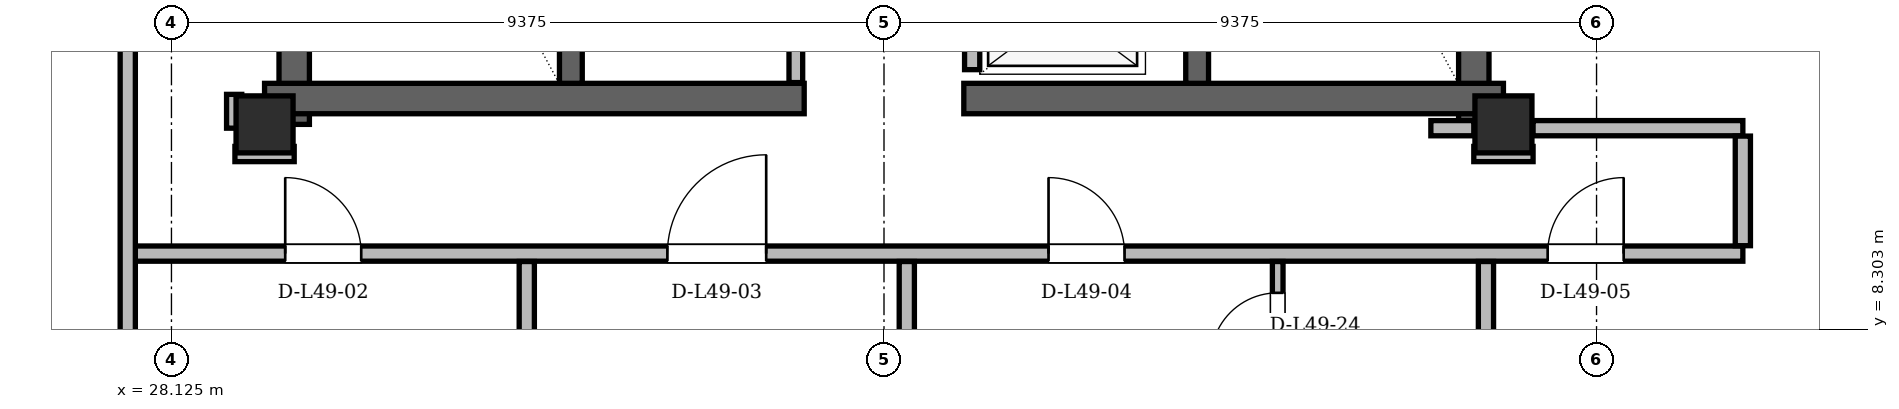
"""IFC4 building model, lengths in metres.
Left out: names, types, materials, properties, quantities, classifications, styles, units other than length and angle.
Written with IfcOpenShell. Run it as: python <this file> out.ifc"""

import sys

from ifc_helpers import new_model, si_unit, direction, frame, frame_2d, origin, origin_2d, place, context, subcontext, project, spatial, rectangle, hollow_rectangle, extrude, element, fill, save


model = new_model("IFC4")
c1 = context("Model", 3, precision=1e-05, world=origin(), true_north=direction((0.0, 1.0)))
c2 = subcontext(c1, "Body", "Model", "MODEL_VIEW")
j1 = project(units=[si_unit("LENGTHUNIT", "METRE"), si_unit("PLANEANGLEUNIT", "RADIAN")], contexts=[c1])
p1 = place(None, origin())
s1 = spatial("IfcSite", under=j1, at=p1, CompositionType="ELEMENT")
p2 = place(p1, origin())
s2 = spatial("IfcBuilding", under=s1, at=p2, CompositionType="ELEMENT")
p3 = place(p2, frame((0.0, 0.0, 185.4)))
s3 = spatial("IfcBuildingStorey", under=s2, at=p3, CompositionType="ELEMENT", Elevation=185.4)
for number, where, z_axis, x_axis in (
    (1, (29.35, 11.0, 0.0), (0.0, 0.0, 1.0), (1.0, 0.0, 0.0)),
    (2, (45.65, 11.0, 0.0), (0.0, 0.0, 1.0), (1.0, 0.0, 0.0)),
):
    element("IfcColumn", number, at=place(p3, frame(where, z_axis=z_axis, x_axis=x_axis)), inside=s3, PredefinedType="COLUMN", context=c2, shape_type="SweptSolid", body=[
        extrude(hollow_rectangle(XDim=0.75, YDim=0.75, WallThickness=0.06, at=origin_2d()), origin(), (0.0, 0.0, 1.0), 3.6),
    ])
for number, where, z_axis, x_axis in (
    (3, (29.74, 11.0, 0.0), (0.0, 0.0, 1.0), (0.0, 1.0, 0.0)),
    (4, (45.26, 11.0, 0.0), (0.0, 0.0, 1.0), (0.0, 1.0, 0.0)),
):
    element("IfcWall", number, at=place(p3, frame(where, z_axis=z_axis, x_axis=x_axis)), inside=s3, PredefinedType="SHEAR", context=c2, shape_type="SweptSolid", body=[
        extrude(rectangle(XDim=13.3, YDim=0.4, at=frame_2d((6.65, 0.0))), origin(), (0.0, 0.0, 1.0), 3.34),
    ])
for number, where, z_axis, x_axis in (
    (5, (29.35, 11.34, 0.0), (0.0, 0.0, 1.0), (1.0, 0.0, 0.0)),
    (6, (38.55, 11.34, 0.0), (0.0, 0.0, 1.0), (1.0, 0.0, 0.0)),
):
    element("IfcWall", number, at=place(p3, frame(where, z_axis=z_axis, x_axis=x_axis)), inside=s3, PredefinedType="SHEAR", context=c2, shape_type="SweptSolid", body=[
        extrude(rectangle(XDim=7.1, YDim=0.4, at=frame_2d((3.55, 0.0))), origin(), (0.0, 0.0, 1.0), 3.34),
    ])
for number, where, z_axis, x_axis in (
    (7, (33.38, 11.54, 0.0), (0.0, 0.0, 1.0), (0.0, 1.0, 0.0)),
    (8, (41.62, 11.54, 0.0), (0.0, 0.0, 1.0), (0.0, 1.0, 0.0)),
):
    element("IfcWall", number, at=place(p3, frame(where, z_axis=z_axis, x_axis=x_axis)), inside=s3, PredefinedType="SHEAR", context=c2, shape_type="SweptSolid", body=[
        extrude(rectangle(XDim=7.62, YDim=0.3, at=frame_2d((3.81, 0.0))), origin(), (0.0, 0.0, 1.0), 3.34),
    ])
p4 = place(p3, frame((59.519, 11.962, 0.0), z_axis=(0.0, 0.0, 1.0), x_axis=(-0.500007042689, 0.866021337648, 0.0)))
e9 = element("IfcWall", 9, at=p4, inside=s3, PredefinedType="SOLIDWALL", context=c2, shape_type="SweptSolid", body=[
    extrude(rectangle(XDim=36.115, YDim=0.29, at=frame_2d((18.057, 0.0))), origin(), (0.0, 0.0, 1.0), 2.56),
])
p5 = place(p4, frame((8.034, 0.0, 0.0)))
e10 = element("IfcOpeningElement", 10, at=p5, cuts=e9, PredefinedType="OPENING", context=c2, shape_type="SweptSolid", body=[
    extrude(rectangle(XDim=1.5, YDim=2.2, at=frame_2d((0.75, 1.1))), frame((0.0, 0.145, 0.0), z_axis=(0.0, -1.0, 0.0), x_axis=(1.0, 0.0, 0.0)), (0.0, 0.0, 1.0), 0.29),
])
p6 = place(p4, frame((28.035, 0.0, 0.0)))
e11 = element("IfcOpeningElement", 11, at=p6, cuts=e9, PredefinedType="OPENING", context=c2, shape_type="SweptSolid", body=[
    extrude(rectangle(XDim=1.5, YDim=2.2, at=frame_2d((0.75, 1.1))), frame((0.0, 0.145, 0.0), z_axis=(0.0, -1.0, 0.0), x_axis=(1.0, 0.0, 0.0)), (0.0, 0.0, 1.0), 0.29),
])
p7 = place(p4, frame((2.16, 0.0, 0.85)))
e12 = element("IfcOpeningElement", 12, at=p7, cuts=e9, PredefinedType="OPENING", context=c2, shape_type="SweptSolid", body=[
    extrude(rectangle(XDim=1.4, YDim=1.6, at=frame_2d((0.7, 0.8))), frame((0.0, 0.145, 0.0), z_axis=(0.0, -1.0, 0.0), x_axis=(1.0, 0.0, 0.0)), (0.0, 0.0, 1.0), 0.29),
])
p8 = place(p4, frame((14.363, 0.0, 0.85)))
e13 = element("IfcOpeningElement", 13, at=p8, cuts=e9, PredefinedType="OPENING", context=c2, shape_type="SweptSolid", body=[
    extrude(rectangle(XDim=1.2, YDim=1.48, at=frame_2d((0.6, 0.74))), frame((0.0, 0.145, 0.0), z_axis=(0.0, -1.0, 0.0), x_axis=(1.0, 0.0, 0.0)), (0.0, 0.0, 1.0), 0.29),
])
p9 = place(p4, frame((21.574, 0.0, 0.85)))
e14 = element("IfcOpeningElement", 14, at=p9, cuts=e9, PredefinedType="OPENING", context=c2, shape_type="SweptSolid", body=[
    extrude(rectangle(XDim=2.8, YDim=1.6, at=frame_2d((1.4, 0.8))), frame((0.0, 0.145, 0.0), z_axis=(0.0, -1.0, 0.0), x_axis=(1.0, 0.0, 0.0)), (0.0, 0.0, 1.0), 0.29),
])
p10 = place(p4, frame((32.304, 0.0, 0.85)))
e15 = element("IfcOpeningElement", 15, at=p10, cuts=e9, PredefinedType="OPENING", context=c2, shape_type="SweptSolid", body=[
    extrude(rectangle(XDim=1.6, YDim=1.6, at=frame_2d((0.8, 0.8))), frame((0.0, 0.145, 0.0), z_axis=(0.0, -1.0, 0.0), x_axis=(1.0, 0.0, 0.0)), (0.0, 0.0, 1.0), 0.29),
])
p11 = place(p3, frame((33.539, 43.238, 0.0), z_axis=(0.0, 0.0, 1.0), x_axis=(-0.500007042689, -0.866021337648, 0.0)))
e16 = element("IfcWall", 16, at=p11, inside=s3, PredefinedType="SOLIDWALL", context=c2, shape_type="SweptSolid", body=[
    extrude(rectangle(XDim=36.115, YDim=0.29, at=frame_2d((18.057, 0.0))), origin(), (0.0, 0.0, 1.0), 2.56),
])
p12 = place(p11, frame((8.034, 0.0, 0.0)))
e17 = element("IfcOpeningElement", 17, at=p12, cuts=e16, PredefinedType="OPENING", context=c2, shape_type="SweptSolid", body=[
    extrude(rectangle(XDim=1.5, YDim=2.2, at=frame_2d((0.75, 1.1))), frame((0.0, 0.145, 0.0), z_axis=(0.0, -1.0, 0.0), x_axis=(1.0, 0.0, 0.0)), (0.0, 0.0, 1.0), 0.29),
])
p13 = place(p11, frame((28.035, 0.0, 0.0)))
e18 = element("IfcOpeningElement", 18, at=p13, cuts=e16, PredefinedType="OPENING", context=c2, shape_type="SweptSolid", body=[
    extrude(rectangle(XDim=1.5, YDim=2.2, at=frame_2d((0.75, 1.1))), frame((0.0, 0.145, 0.0), z_axis=(0.0, -1.0, 0.0), x_axis=(1.0, 0.0, 0.0)), (0.0, 0.0, 1.0), 0.29),
])
p14 = place(p11, frame((33.831, 0.0, 0.85)))
e19 = element("IfcOpeningElement", 19, at=p14, cuts=e16, PredefinedType="OPENING", context=c2, shape_type="SweptSolid", body=[
    extrude(rectangle(XDim=1.2, YDim=1.48, at=frame_2d((0.6, 0.74))), frame((0.0, 0.145, 0.0), z_axis=(0.0, -1.0, 0.0), x_axis=(1.0, 0.0, 0.0)), (0.0, 0.0, 1.0), 0.29),
])
p15 = place(p11, frame((18.648, 0.0, 0.85)))
e20 = element("IfcOpeningElement", 20, at=p15, cuts=e16, PredefinedType="OPENING", context=c2, shape_type="SweptSolid", body=[
    extrude(rectangle(XDim=2.0, YDim=1.6, at=frame_2d((1.0, 0.8))), frame((0.0, 0.145, 0.0), z_axis=(0.0, -1.0, 0.0), x_axis=(1.0, 0.0, 0.0)), (0.0, 0.0, 1.0), 0.29),
])
p16 = place(p11, frame((26.235, 0.0, 0.85)))
e21 = element("IfcOpeningElement", 21, at=p16, cuts=e16, PredefinedType="OPENING", context=c2, shape_type="SweptSolid", body=[
    extrude(rectangle(XDim=1.2, YDim=1.48, at=frame_2d((0.6, 0.74))), frame((0.0, 0.145, 0.0), z_axis=(0.0, -1.0, 0.0), x_axis=(1.0, 0.0, 0.0)), (0.0, 0.0, 1.0), 0.29),
])
p17 = place(p11, frame((15.622, 0.0, 0.85)))
e22 = element("IfcOpeningElement", 22, at=p17, cuts=e16, PredefinedType="OPENING", context=c2, shape_type="SweptSolid", body=[
    extrude(rectangle(XDim=1.2, YDim=1.48, at=frame_2d((0.6, 0.74))), frame((0.0, 0.145, 0.0), z_axis=(0.0, -1.0, 0.0), x_axis=(1.0, 0.0, 0.0)), (0.0, 0.0, 1.0), 0.29),
])
p18 = place(p11, frame((6.537, 0.0, 0.85)))
e23 = element("IfcOpeningElement", 23, at=p18, cuts=e16, PredefinedType="OPENING", context=c2, shape_type="SweptSolid", body=[
    extrude(rectangle(XDim=1.2, YDim=1.48, at=frame_2d((0.6, 0.74))), frame((0.0, 0.145, 0.0), z_axis=(0.0, -1.0, 0.0), x_axis=(1.0, 0.0, 0.0)), (0.0, 0.0, 1.0), 0.29),
])
p19 = place(p11, frame((13.204, 0.0, 0.85)))
e24 = element("IfcOpeningElement", 24, at=p19, cuts=e16, PredefinedType="OPENING", context=c2, shape_type="SweptSolid", body=[
    extrude(rectangle(XDim=1.6, YDim=1.6, at=frame_2d((0.8, 0.8))), frame((0.0, 0.145, 0.0), z_axis=(0.0, -1.0, 0.0), x_axis=(1.0, 0.0, 0.0)), (0.0, 0.0, 1.0), 0.29),
])
p20 = place(p11, frame((1.107, 0.0, 0.85)))
e25 = element("IfcOpeningElement", 25, at=p20, cuts=e16, PredefinedType="OPENING", context=c2, shape_type="SweptSolid", body=[
    extrude(rectangle(XDim=2.0, YDim=1.6, at=frame_2d((1.0, 0.8))), frame((0.0, 0.145, 0.0), z_axis=(0.0, -1.0, 0.0), x_axis=(1.0, 0.0, 0.0)), (0.0, 0.0, 1.0), 0.29),
])
p21 = place(p3, frame((36.34, 11.55, 0.0), z_axis=(0.0, 0.0, 1.0), x_axis=(0.0, 1.0, 0.0)))
e26 = element("IfcWall", 26, at=p21, inside=s3, PredefinedType="PARTITIONING", context=c2, shape_type="SweptSolid", body=[
    extrude(rectangle(XDim=5.55, YDim=0.18, at=frame_2d((2.775, 0.0))), origin(), (0.0, 0.0, 1.0), 3.34),
])
p22 = place(p21, frame((2.85, 0.0, 0.0)))
e27 = element("IfcOpeningElement", 27, at=p22, cuts=e26, PredefinedType="OPENING", context=c2, shape_type="SweptSolid", body=[
    extrude(rectangle(XDim=0.95, YDim=2.1, at=frame_2d((0.475, 1.05))), frame((0.0, 0.09, 0.0), z_axis=(0.0, -1.0, 0.0), x_axis=(1.0, 0.0, 0.0)), (0.0, 0.0, 1.0), 0.18),
])
p23 = place(p3, frame((38.66, 11.72, 0.0), z_axis=(0.0, 0.0, 1.0), x_axis=(0.0, 1.0, 0.0)))
e28 = element("IfcWall", 28, at=p23, inside=s3, PredefinedType="PARTITIONING", context=c2, shape_type="SweptSolid", body=[
    extrude(rectangle(XDim=9.1, YDim=0.2, at=frame_2d((4.55, 0.0))), origin(), (0.0, 0.0, 1.0), 3.34),
])
p24 = place(p23, frame((0.255, 0.0, 0.0)))
e29 = element("IfcOpeningElement", 29, at=p24, cuts=e28, PredefinedType="OPENING", context=c2, shape_type="SweptSolid", body=[
    extrude(rectangle(XDim=1.05, YDim=2.15, at=frame_2d((0.525, 1.075))), frame((0.0, 0.1, 0.0), z_axis=(0.0, -1.0, 0.0), x_axis=(1.0, 0.0, 0.0)), (0.0, 0.0, 1.0), 0.2),
])
p25 = place(p23, frame((2.105, 0.0, 0.0)))
e30 = element("IfcOpeningElement", 30, at=p25, cuts=e28, PredefinedType="OPENING", context=c2, shape_type="SweptSolid", body=[
    extrude(rectangle(XDim=1.05, YDim=2.15, at=frame_2d((0.525, 1.075))), frame((0.0, 0.1, 0.0), z_axis=(0.0, -1.0, 0.0), x_axis=(1.0, 0.0, 0.0)), (0.0, 0.0, 1.0), 0.2),
])
p26 = place(p23, frame((3.955, 0.0, 0.0)))
e31 = element("IfcOpeningElement", 31, at=p26, cuts=e28, PredefinedType="OPENING", context=c2, shape_type="SweptSolid", body=[
    extrude(rectangle(XDim=1.05, YDim=2.15, at=frame_2d((0.525, 1.075))), frame((0.0, 0.1, 0.0), z_axis=(0.0, -1.0, 0.0), x_axis=(1.0, 0.0, 0.0)), (0.0, 0.0, 1.0), 0.2),
])
p27 = place(p3, frame((27.55, 9.3, 0.0), z_axis=(0.0, 0.0, 1.0), x_axis=(1.0, 0.0, 0.0)))
e32 = element("IfcWall", 32, at=p27, inside=s3, PredefinedType="PARTITIONING", context=c2, shape_type="SweptSolid", body=[
    extrude(rectangle(XDim=21.25, YDim=0.2, at=frame_2d((10.625, 0.0))), origin(), (0.0, 0.0, 1.0), 2.802),
])
p28 = place(p27, frame((2.072, 0.0, 0.0)))
e33 = element("IfcOpeningElement", 33, at=p28, cuts=e32, PredefinedType="OPENING", context=c2, shape_type="SweptSolid", body=[
    extrude(rectangle(XDim=1.0, YDim=2.18, at=frame_2d((0.5, 1.09))), frame((0.0, 0.1, 0.0), z_axis=(0.0, -1.0, 0.0), x_axis=(1.0, 0.0, 0.0)), (0.0, 0.0, 1.0), 0.2),
])
p29 = place(p27, frame((7.1, 0.0, 0.0)))
e34 = element("IfcOpeningElement", 34, at=p29, cuts=e32, PredefinedType="OPENING", context=c2, shape_type="SweptSolid", body=[
    extrude(rectangle(XDim=1.3, YDim=2.2, at=frame_2d((0.65, 1.1))), frame((0.0, 0.1, 0.0), z_axis=(0.0, -1.0, 0.0), x_axis=(1.0, 0.0, 0.0)), (0.0, 0.0, 1.0), 0.2),
])
p30 = place(p27, frame((12.115, 0.0, 0.0)))
e35 = element("IfcOpeningElement", 35, at=p30, cuts=e32, PredefinedType="OPENING", context=c2, shape_type="SweptSolid", body=[
    extrude(rectangle(XDim=1.0, YDim=2.18, at=frame_2d((0.5, 1.09))), frame((0.0, 0.1, 0.0), z_axis=(0.0, -1.0, 0.0), x_axis=(1.0, 0.0, 0.0)), (0.0, 0.0, 1.0), 0.2),
])
p31 = place(p27, frame((18.682, 0.0, 0.0)))
e36 = element("IfcOpeningElement", 36, at=p31, cuts=e32, PredefinedType="OPENING", context=c2, shape_type="SweptSolid", body=[
    extrude(rectangle(XDim=1.0, YDim=2.18, at=frame_2d((0.5, 1.09))), frame((0.0, 0.1, 0.0), z_axis=(0.0, -1.0, 0.0), x_axis=(1.0, 0.0, 0.0)), (0.0, 0.0, 1.0), 0.2),
])
for number, where, z_axis, x_axis in (
    (37, (28.96, 10.61, 0.0), (0.0, 0.0, 1.0), (1.0, 0.0, 0.0)),
    (38, (45.26, 10.61, 0.0), (0.0, 0.0, 1.0), (1.0, 0.0, 0.0)),
):
    element("IfcWall", number, at=place(p3, frame(where, z_axis=z_axis, x_axis=x_axis)), inside=s3, PredefinedType="PARTITIONING", context=c2, shape_type="SweptSolid", body=[
        extrude(rectangle(XDim=0.78, YDim=0.2, at=frame_2d((0.39, 0.0))), origin(), (0.0, 0.0, 1.0), 3.34),
    ])
p32 = place(p3, frame((44.695, 10.95, 0.0), z_axis=(0.0, 0.0, 1.0), x_axis=(1.0, 0.0, 0.0)))
e39 = element("IfcWall", 39, at=p32, inside=s3, PredefinedType="PARTITIONING", context=c2, shape_type="SweptSolid", body=[
    extrude(rectangle(XDim=0.565, YDim=0.2, at=frame_2d((0.282, 0.0))), origin(), (0.0, 0.0, 1.0), 2.48),
])
p33 = place(p3, frame((46.04, 10.95, 0.0), z_axis=(0.0, 0.0, 1.0), x_axis=(1.0, 0.0, 0.0)))
e40 = element("IfcWall", 40, at=p33, inside=s3, PredefinedType="PARTITIONING", context=c2, shape_type="SweptSolid", body=[
    extrude(rectangle(XDim=2.76, YDim=0.2, at=frame_2d((1.38, 0.0))), origin(), (0.0, 0.0, 1.0), 2.802),
])
p34 = place(p3, frame((27.55, 5.25, 0.0), z_axis=(0.0, 0.0, 1.0), x_axis=(0.0, 1.0, 0.0)))
e41 = element("IfcWall", 41, at=p34, inside=s3, PredefinedType="PARTITIONING", context=c2, shape_type="SweptSolid", body=[
    extrude(rectangle(XDim=11.497, YDim=0.2, at=frame_2d((5.748, 0.0))), origin(), (0.0, 0.0, 1.0), 2.802),
])
p35 = place(p34, frame((8.076, 0.0, 0.0)))
e42 = element("IfcOpeningElement", 42, at=p35, cuts=e41, PredefinedType="OPENING", context=c2, shape_type="SweptSolid", body=[
    extrude(rectangle(XDim=1.0, YDim=2.18, at=frame_2d((0.5, 1.09))), frame((0.0, 0.1, 0.0), z_axis=(0.0, -1.0, 0.0), x_axis=(1.0, 0.0, 0.0)), (0.0, 0.0, 1.0), 0.2),
])
p36 = place(p3, frame((28.95, 10.95, 0.0), z_axis=(0.0, 0.0, 1.0), x_axis=(0.0, 1.0, 0.0)))
e43 = element("IfcWall", 43, at=p36, inside=s3, PredefinedType="PARTITIONING", context=c2, shape_type="SweptSolid", body=[
    extrude(rectangle(XDim=0.445, YDim=0.2, at=frame_2d((0.223, 0.0))), origin(), (0.0, 0.0, 1.0), 2.802),
])
p37 = place(p3, frame((32.8, 5.25, 0.0), z_axis=(0.0, 0.0, 1.0), x_axis=(0.0, 1.0, 0.0)))
e44 = element("IfcWall", 44, at=p37, inside=s3, PredefinedType="PARTITIONING", context=c2, shape_type="SweptSolid", body=[
    extrude(rectangle(XDim=3.947, YDim=0.2, at=frame_2d((1.973, 0.0))), origin(), (0.0, 0.0, 1.0), 2.926),
])
p38 = place(p3, frame((37.8, 5.25, 0.0), z_axis=(0.0, 0.0, 1.0), x_axis=(0.0, 1.0, 0.0)))
e45 = element("IfcWall", 45, at=p38, inside=s3, PredefinedType="PARTITIONING", context=c2, shape_type="SweptSolid", body=[
    extrude(rectangle(XDim=3.947, YDim=0.2, at=frame_2d((1.973, 0.0))), origin(), (0.0, 0.0, 1.0), 3.34),
])
p39 = place(p3, frame((42.68, 5.25, 0.0), z_axis=(0.0, 0.0, 1.0), x_axis=(0.0, 1.0, 0.0)))
e46 = element("IfcWall", 46, at=p39, inside=s3, PredefinedType="PARTITIONING", context=c2, shape_type="SweptSolid", body=[
    extrude(rectangle(XDim=3.947, YDim=0.14, at=frame_2d((1.973, 0.0))), origin(), (0.0, 0.0, 1.0), 2.926),
])
p40 = place(p39, frame((0.564, 0.0, 0.0)))
e47 = element("IfcOpeningElement", 47, at=p40, cuts=e46, PredefinedType="OPENING", context=c2, shape_type="SweptSolid", body=[
    extrude(rectangle(XDim=0.95, YDim=2.1, at=frame_2d((0.475, 1.05))), frame((0.0, 0.07, 0.0), z_axis=(0.0, -1.0, 0.0), x_axis=(1.0, 0.0, 0.0)), (0.0, 0.0, 1.0), 0.14),
])
p41 = place(p39, frame((2.654, 0.0, 0.0)))
e48 = element("IfcOpeningElement", 48, at=p41, cuts=e46, PredefinedType="OPENING", context=c2, shape_type="SweptSolid", body=[
    extrude(rectangle(XDim=0.88, YDim=2.08, at=frame_2d((0.44, 1.04))), frame((0.0, 0.07, 0.0), z_axis=(0.0, -1.0, 0.0), x_axis=(1.0, 0.0, 0.0)), (0.0, 0.0, 1.0), 0.14),
])
p42 = place(p3, frame((45.42, 5.25, 0.0), z_axis=(0.0, 0.0, 1.0), x_axis=(0.0, 1.0, 0.0)))
e49 = element("IfcWall", 49, at=p42, inside=s3, PredefinedType="PARTITIONING", context=c2, shape_type="SweptSolid", body=[
    extrude(rectangle(XDim=3.947, YDim=0.2, at=frame_2d((1.973, 0.0))), origin(), (0.0, 0.0, 1.0), 3.34),
])
p43 = place(p3, frame((48.8, 9.404, 0.0), z_axis=(0.0, 0.0, 1.0), x_axis=(0.0, 1.0, 0.0)))
e50 = element("IfcWall", 50, at=p43, inside=s3, PredefinedType="PARTITIONING", context=c2, shape_type="SweptSolid", body=[
    extrude(rectangle(XDim=1.442, YDim=0.2, at=frame_2d((0.721, 0.0))), origin(), (0.0, 0.0, 1.0), 3.34),
])
p44 = place(p28, origin())
e51 = element("IfcDoor", 51, at=p44, inside=s3, OperationType="SINGLE_SWING_LEFT", PredefinedType="DOOR", context=c2, shape_type="SweptSolid", body=[
    extrude(rectangle(XDim=1.0, YDim=2.18, at=frame_2d((0.5, 1.09))), frame((0.0, 0.025, 0.0), z_axis=(0.0, -1.0, 0.0), x_axis=(1.0, 0.0, 0.0)), (0.0, 0.0, 1.0), 0.05),
])
fill(e33, e51)
p45 = place(p29, origin())
e52 = element("IfcDoor", 52, at=p45, inside=s3, OperationType="SINGLE_SWING_RIGHT", PredefinedType="DOOR", context=c2, shape_type="SweptSolid", body=[
    extrude(rectangle(XDim=1.3, YDim=2.2, at=frame_2d((0.65, 1.1))), frame((0.0, 0.025, 0.0), z_axis=(0.0, -1.0, 0.0), x_axis=(1.0, 0.0, 0.0)), (0.0, 0.0, 1.0), 0.05),
])
fill(e34, e52)
p46 = place(p30, origin())
e53 = element("IfcDoor", 53, at=p46, inside=s3, OperationType="SINGLE_SWING_LEFT", PredefinedType="DOOR", context=c2, shape_type="SweptSolid", body=[
    extrude(rectangle(XDim=1.0, YDim=2.18, at=frame_2d((0.5, 1.09))), frame((0.0, 0.025, 0.0), z_axis=(0.0, -1.0, 0.0), x_axis=(1.0, 0.0, 0.0)), (0.0, 0.0, 1.0), 0.05),
])
fill(e35, e53)
p47 = place(p31, origin())
e54 = element("IfcDoor", 54, at=p47, inside=s3, OperationType="SINGLE_SWING_RIGHT", PredefinedType="DOOR", context=c2, shape_type="SweptSolid", body=[
    extrude(rectangle(XDim=1.0, YDim=2.18, at=frame_2d((0.5, 1.09))), frame((0.0, 0.025, 0.0), z_axis=(0.0, -1.0, 0.0), x_axis=(1.0, 0.0, 0.0)), (0.0, 0.0, 1.0), 0.05),
])
fill(e36, e54)
p48 = place(p41, origin())
e55 = element("IfcDoor", 55, at=p48, inside=s3, OperationType="SINGLE_SWING_LEFT", PredefinedType="DOOR", context=c2, shape_type="SweptSolid", body=[
    extrude(rectangle(XDim=0.88, YDim=2.08, at=frame_2d((0.44, 1.04))), frame((0.0, 0.025, 0.0), z_axis=(0.0, -1.0, 0.0), x_axis=(1.0, 0.0, 0.0)), (0.0, 0.0, 1.0), 0.05),
])
fill(e48, e55)
save(model, sys.argv[1])
